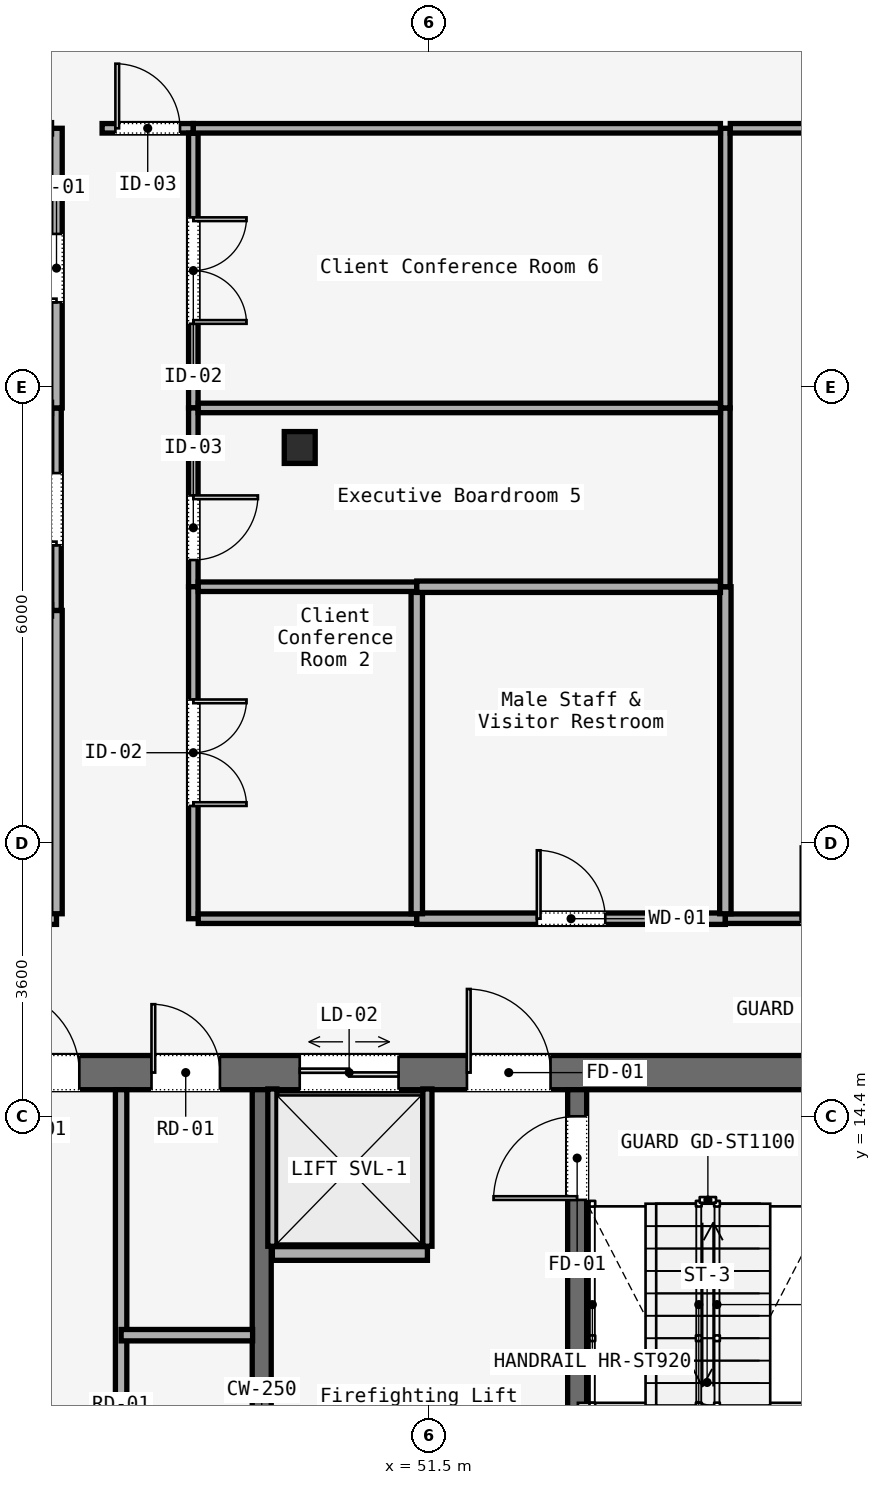
"""IFC4 building model, lengths in metres.
Left out: names, types, materials, properties, quantities, classifications, styles, units other than length and angle.
Written with IfcOpenShell. Run it as: python <this file> out.ifc"""

import sys

from ifc_helpers import new_model, si_unit, direction, frame, frame_2d, origin, origin_2d, place, context, subcontext, project, spatial, rectangle, i_section, extrude, element, fill, save


model = new_model("IFC4")
c1 = context("Model", 3, precision=1e-05, world=origin(), true_north=direction((0.0, 1.0)))
c2 = subcontext(c1, "Body", "Model", "MODEL_VIEW")
j1 = project(units=[si_unit("LENGTHUNIT", "METRE"), si_unit("PLANEANGLEUNIT", "RADIAN")], contexts=[c1])
p1 = place(None, origin())
s1 = spatial("IfcSite", under=j1, at=p1, CompositionType="ELEMENT")
p2 = place(p1, origin())
s2 = spatial("IfcBuilding", under=s1, at=p2, CompositionType="ELEMENT")
p3 = place(p2, frame((0.0, 0.0, 153.6)))
s3 = spatial("IfcBuildingStorey", under=s2, at=p3, CompositionType="ELEMENT", Elevation=153.6)
p4 = place(p3, frame((26.45, 14.975, 0.0), z_axis=(0.0, 0.0, 1.0), x_axis=(1.0, 0.0, 0.0)))
e1 = element("IfcWall", 1, at=p4, inside=s3, PredefinedType="SOLIDWALL", context=c2, shape_type="SweptSolid", body=[
    extrude(rectangle(XDim=31.1, YDim=0.45, at=frame_2d((15.55, 0.0))), origin(), (0.0, 0.0, 1.0), 3.58),
])
p5 = place(p4, frame((1.65, 0.0, 0.0)))
e2 = element("IfcOpeningElement", 2, at=p5, cuts=e1, PredefinedType="OPENING", context=c2, shape_type="SweptSolid", body=[
    extrude(rectangle(XDim=1.1, YDim=2.2, at=frame_2d((0.55, 1.1))), frame((0.0, 0.225, 0.0), z_axis=(0.0, -1.0, 0.0), x_axis=(1.0, 0.0, 0.0)), (0.0, 0.0, 1.0), 0.45),
])
p6 = place(p4, frame((13.65, 0.0, 0.0)))
e3 = element("IfcOpeningElement", 3, at=p6, cuts=e1, PredefinedType="OPENING", context=c2, shape_type="SweptSolid", body=[
    extrude(rectangle(XDim=1.1, YDim=2.2, at=frame_2d((0.55, 1.1))), frame((0.0, 0.225, 0.0), z_axis=(0.0, -1.0, 0.0), x_axis=(1.0, 0.0, 0.0)), (0.0, 0.0, 1.0), 0.45),
])
p7 = place(p4, frame((25.55, 0.0, 0.0)))
e4 = element("IfcOpeningElement", 4, at=p7, cuts=e1, PredefinedType="OPENING", context=c2, shape_type="SweptSolid", body=[
    extrude(rectangle(XDim=1.1, YDim=2.2, at=frame_2d((0.55, 1.1))), frame((0.0, 0.225, 0.0), z_axis=(0.0, -1.0, 0.0), x_axis=(1.0, 0.0, 0.0)), (0.0, 0.0, 1.0), 0.45),
])
p8 = place(p4, frame((10.7, 0.0, 0.0)))
e5 = element("IfcOpeningElement", 5, at=p8, cuts=e1, PredefinedType="OPENING", context=c2, shape_type="SweptSolid", body=[
    extrude(rectangle(XDim=1.4, YDim=2.2, at=frame_2d((0.7, 1.1))), frame((0.0, 0.225, 0.0), z_axis=(0.0, -1.0, 0.0), x_axis=(1.0, 0.0, 0.0)), (0.0, 0.0, 1.0), 0.45),
])
p9 = place(p4, frame((19.35, 0.0, 0.0)))
e6 = element("IfcOpeningElement", 6, at=p9, cuts=e1, PredefinedType="OPENING", context=c2, shape_type="SweptSolid", body=[
    extrude(rectangle(XDim=1.1, YDim=2.2, at=frame_2d((0.55, 1.1))), frame((0.0, 0.225, 0.0), z_axis=(0.0, -1.0, 0.0), x_axis=(1.0, 0.0, 0.0)), (0.0, 0.0, 1.0), 0.45),
])
p10 = place(p4, frame((21.4, 0.0, 0.0)))
e7 = element("IfcOpeningElement", 7, at=p10, cuts=e1, PredefinedType="OPENING", context=c2, shape_type="SweptSolid", body=[
    extrude(rectangle(XDim=0.9, YDim=2.1, at=frame_2d((0.45, 1.05))), frame((0.0, 0.225, 0.0), z_axis=(0.0, -1.0, 0.0), x_axis=(1.0, 0.0, 0.0)), (0.0, 0.0, 1.0), 0.45),
])
p11 = place(p4, frame((23.35, 0.0, 0.0)))
e8 = element("IfcOpeningElement", 8, at=p11, cuts=e1, PredefinedType="OPENING", context=c2, shape_type="SweptSolid", body=[
    extrude(rectangle(XDim=1.3, YDim=2.3, at=frame_2d((0.65, 1.15))), frame((0.0, 0.225, 0.0), z_axis=(0.0, -1.0, 0.0), x_axis=(1.0, 0.0, 0.0)), (0.0, 0.0, 1.0), 0.45),
])
p12 = place(p3, frame((49.3, 5.85, 0.0), z_axis=(0.0, 0.0, 1.0), x_axis=(0.0, 1.0, 0.0)))
e9 = element("IfcWall", 9, at=p12, inside=s3, PredefinedType="SOLIDWALL", context=c2, shape_type="SweptSolid", body=[
    extrude(rectangle(XDim=8.9, YDim=0.25, at=frame_2d((4.45, 0.0))), origin(), (0.0, 0.0, 1.0), 3.58),
])
p13 = place(p3, frame((53.45, 5.85, 0.0), z_axis=(0.0, 0.0, 1.0), x_axis=(0.0, 1.0, 0.0)))
e10 = element("IfcWall", 10, at=p13, inside=s3, PredefinedType="SOLIDWALL", context=c2, shape_type="SweptSolid", body=[
    extrude(rectangle(XDim=8.9, YDim=0.25, at=frame_2d((4.45, 0.0))), origin(), (0.0, 0.0, 1.0), 3.58),
])
p14 = place(p13, frame((7.45, 0.0, 0.0)))
e11 = element("IfcOpeningElement", 11, at=p14, cuts=e10, PredefinedType="OPENING", context=c2, shape_type="SweptSolid", body=[
    extrude(rectangle(XDim=1.1, YDim=2.2, at=frame_2d((0.55, 1.1))), frame((0.0, 0.125, 0.0), z_axis=(0.0, -1.0, 0.0), x_axis=(1.0, 0.0, 0.0)), (0.0, 0.0, 1.0), 0.25),
])
p15 = place(p3, frame((49.8, 23.2, 0.0), z_axis=(0.0, 0.0, 1.0), x_axis=(1.0, 0.0, 0.0)))
e12 = element("IfcColumn", 12, at=p15, inside=s3, PredefinedType="COLUMN", context=c2, shape_type="SweptSolid", body=[
    extrude(i_section(OverallWidth=0.407, OverallDepth=0.419, WebThickness=0.031, FlangeThickness=0.049, FilletRadius=0.015, at=origin_2d()), origin(), (0.0, 0.0, 1.0), 3.58),
])
p16 = place(p3, frame((47.45, 5.9, 0.0), z_axis=(0.0, 0.0, 1.0), x_axis=(0.0, 1.0, 0.0)))
e13 = element("IfcWall", 13, at=p16, inside=s3, PredefinedType="PARTITIONING", context=c2, shape_type="SweptSolid", body=[
    extrude(rectangle(XDim=8.85, YDim=0.15, at=frame_2d((4.425, 0.0))), origin(), (0.0, 0.0, 1.0), 3.01),
])
p17 = place(p16, frame((3.2, 0.0, 0.0)))
e14 = element("IfcOpeningElement", 14, at=p17, cuts=e13, PredefinedType="OPENING", context=c2, shape_type="SweptSolid", body=[
    extrude(rectangle(XDim=0.9, YDim=2.1, at=frame_2d((0.45, 1.05))), frame((0.0, 0.075, 0.0), z_axis=(0.0, -1.0, 0.0), x_axis=(1.0, 0.0, 0.0)), (0.0, 0.0, 1.0), 0.15),
])
p18 = place(p3, frame((47.45, 11.52, 0.0), z_axis=(0.0, 0.0, 1.0), x_axis=(1.0, 0.0, 0.0)))
e15 = element("IfcWall", 15, at=p18, inside=s3, PredefinedType="PARTITIONING", context=c2, shape_type="SweptSolid", body=[
    extrude(rectangle(XDim=1.73, YDim=0.15, at=frame_2d((0.865, 0.0))), origin(), (0.0, 0.0, 1.0), 3.01),
])
p19 = place(p3, frame((49.44, 12.595, 0.0), z_axis=(0.0, 0.0, 1.0), x_axis=(1.0, 0.0, 0.0)))
e16 = element("IfcWall", 16, at=p19, inside=s3, PredefinedType="SOLIDWALL", context=c2, shape_type="SweptSolid", body=[
    extrude(rectangle(XDim=2.04, YDim=0.18, at=frame_2d((1.02, 0.0))), origin(), (0.0, 0.0, 1.0), 3.01),
])
for number, where, z_axis, x_axis in (
    (17, (49.44, 12.69, 0.0), (0.0, 0.0, 1.0), (0.0, 1.0, 0.0)),
    (18, (51.48, 12.69, 0.0), (0.0, 0.0, 1.0), (0.0, 1.0, 0.0)),
):
    element("IfcWall", number, at=place(p3, frame(where, z_axis=z_axis, x_axis=x_axis)), inside=s3, PredefinedType="SOLIDWALL", context=c2, shape_type="SweptSolid", body=[
        extrude(rectangle(XDim=2.07, YDim=0.12, at=frame_2d((1.035, 0.0))), origin(), (0.0, 0.0, 1.0), 3.01),
    ])
p20 = place(p3, frame((41.11, 17.0, 0.0), z_axis=(0.0, 0.0, 1.0), x_axis=(1.0, 0.0, 0.0)))
e19 = element("IfcWall", 19, at=p20, inside=s3, PredefinedType="PARTITIONING", context=c2, shape_type="SweptSolid", body=[
    extrude(rectangle(XDim=5.49, YDim=0.15, at=frame_2d((2.745, 0.0))), origin(), (0.0, 0.0, 1.0), 3.01),
])
p21 = place(p20, frame((2.27, 0.0, 0.0)))
e20 = element("IfcOpeningElement", 20, at=p21, cuts=e19, PredefinedType="OPENING", context=c2, shape_type="SweptSolid", body=[
    extrude(rectangle(XDim=0.95, YDim=2.2, at=frame_2d((0.475, 1.1))), frame((0.0, 0.075, 0.0), z_axis=(0.0, -1.0, 0.0), x_axis=(1.0, 0.0, 0.0)), (0.0, 0.0, 1.0), 0.15),
])
p22 = place(p3, frame((46.6, 17.065, 0.0), z_axis=(0.0, 0.0, 1.0), x_axis=(0.0, 1.0, 0.0)))
e21 = element("IfcWall", 21, at=p22, inside=s3, PredefinedType="PARTITIONING", context=c2, shape_type="SweptSolid", body=[
    extrude(rectangle(XDim=3.991, YDim=0.15, at=frame_2d((1.996, 0.0))), origin(), (0.0, 0.0, 1.0), 3.01),
])
p23 = place(p3, frame((46.6, 21.056, 0.0), z_axis=(0.0, 0.0, 1.0), x_axis=(0.0, 1.0, 0.0)))
e22 = element("IfcWall", 22, at=p23, inside=s3, PredefinedType="PARTITIONING", context=c2, shape_type="SweptSolid", body=[
    extrude(rectangle(XDim=2.665, YDim=0.125, at=frame_2d((1.332, 0.0))), origin(), (0.0, 0.0, 1.0), 3.01),
])
p24 = place(p23, frame((0.857, 0.0, 0.0)))
e23 = element("IfcOpeningElement", 23, at=p24, cuts=e22, PredefinedType="OPENING", context=c2, shape_type="SweptSolid", body=[
    extrude(rectangle(XDim=0.95, YDim=2.2, at=frame_2d((0.475, 1.1))), frame((0.0, 0.062, 0.0), z_axis=(0.0, -1.0, 0.0), x_axis=(1.0, 0.0, 0.0)), (0.0, 0.0, 1.0), 0.125),
])
p25 = place(p3, frame((46.6, 23.72, 0.0), z_axis=(0.0, 0.0, 1.0), x_axis=(0.0, 1.0, 0.0)))
e24 = element("IfcWall", 24, at=p25, inside=s3, PredefinedType="PARTITIONING", context=c2, shape_type="SweptSolid", body=[
    extrude(rectangle(XDim=3.679, YDim=0.15, at=frame_2d((1.84, 0.0))), origin(), (0.0, 0.0, 1.0), 3.01),
])
p26 = place(p25, frame((1.39, 0.0, 0.0)))
e25 = element("IfcOpeningElement", 25, at=p26, cuts=e24, PredefinedType="OPENING", context=c2, shape_type="SweptSolid", body=[
    extrude(rectangle(XDim=0.9, YDim=2.15, at=frame_2d((0.45, 1.075))), frame((0.0, 0.075, 0.0), z_axis=(0.0, -1.0, 0.0), x_axis=(1.0, 0.0, 0.0)), (0.0, 0.0, 1.0), 0.15),
])
p27 = place(p3, frame((47.2, 27.4, 0.0), z_axis=(0.0, 0.0, 1.0), x_axis=(1.0, 0.0, 0.0)))
e26 = element("IfcWall", 26, at=p27, inside=s3, PredefinedType="PARTITIONING", context=c2, shape_type="SweptSolid", body=[
    extrude(rectangle(XDim=1.2, YDim=0.125, at=frame_2d((0.6, 0.0))), origin(), (0.0, 0.0, 1.0), 3.01),
])
p28 = place(p27, frame((0.175, 0.0, 0.0)))
e27 = element("IfcOpeningElement", 27, at=p28, cuts=e26, PredefinedType="OPENING", context=c2, shape_type="SweptSolid", body=[
    extrude(rectangle(XDim=0.85, YDim=2.15, at=frame_2d((0.425, 1.075))), frame((0.0, 0.062, 0.0), z_axis=(0.0, -1.0, 0.0), x_axis=(1.0, 0.0, 0.0)), (0.0, 0.0, 1.0), 0.125),
])
p29 = place(p3, frame((48.4, 27.335, 0.0), z_axis=(0.0, 0.0, 1.0), x_axis=(0.0, -1.0, 0.0)))
e28 = element("IfcWall", 28, at=p29, inside=s3, PredefinedType="PARTITIONING", context=c2, shape_type="SweptSolid", body=[
    extrude(rectangle(XDim=3.615, YDim=0.125, at=frame_2d((1.807, 0.0))), origin(), (0.0, 0.0, 1.0), 3.01),
])
p30 = place(p29, frame((1.107, 0.0, 0.0)))
e29 = element("IfcOpeningElement", 29, at=p30, cuts=e28, PredefinedType="OPENING", context=c2, shape_type="SweptSolid", body=[
    extrude(rectangle(XDim=1.4, YDim=2.2, at=frame_2d((0.7, 1.1))), frame((0.0, 0.062, 0.0), z_axis=(0.0, -1.0, 0.0), x_axis=(1.0, 0.0, 0.0)), (0.0, 0.0, 1.0), 0.125),
])
p31 = place(p3, frame((48.4, 23.72, 0.0), z_axis=(0.0, 0.0, 1.0), x_axis=(0.0, -1.0, 0.0)))
e30 = element("IfcWall", 30, at=p31, inside=s3, PredefinedType="PARTITIONING", context=c2, shape_type="SweptSolid", body=[
    extrude(rectangle(XDim=2.353, YDim=0.125, at=frame_2d((1.176, 0.0))), origin(), (0.0, 0.0, 1.0), 3.01),
])
p32 = place(p31, frame((1.151, 0.0, 0.0)))
e31 = element("IfcOpeningElement", 31, at=p32, cuts=e30, PredefinedType="OPENING", context=c2, shape_type="SweptSolid", body=[
    extrude(rectangle(XDim=0.85, YDim=2.15, at=frame_2d((0.425, 1.075))), frame((0.0, 0.062, 0.0), z_axis=(0.0, -1.0, 0.0), x_axis=(1.0, 0.0, 0.0)), (0.0, 0.0, 1.0), 0.125),
])
p33 = place(p3, frame((48.4, 21.368, 0.0), z_axis=(0.0, 0.0, 1.0), x_axis=(0.0, -1.0, 0.0)))
e32 = element("IfcWall", 32, at=p33, inside=s3, PredefinedType="PARTITIONING", context=c2, shape_type="SweptSolid", body=[
    extrude(rectangle(XDim=4.368, YDim=0.125, at=frame_2d((2.184, 0.0))), origin(), (0.0, 0.0, 1.0), 3.01),
])
p34 = place(p33, frame((1.484, 0.0, 0.0)))
e33 = element("IfcOpeningElement", 33, at=p34, cuts=e32, PredefinedType="OPENING", context=c2, shape_type="SweptSolid", body=[
    extrude(rectangle(XDim=1.4, YDim=2.2, at=frame_2d((0.7, 1.1))), frame((0.0, 0.062, 0.0), z_axis=(0.0, -1.0, 0.0), x_axis=(1.0, 0.0, 0.0)), (0.0, 0.0, 1.0), 0.125),
])
p35 = place(p3, frame((48.465, 17.0, 0.0), z_axis=(0.0, 0.0, 1.0), x_axis=(1.0, 0.0, 0.0)))
e34 = element("IfcWall", 34, at=p35, inside=s3, PredefinedType="PARTITIONING", context=c2, shape_type="SweptSolid", body=[
    extrude(rectangle(XDim=2.875, YDim=0.125, at=frame_2d((1.438, 0.0))), origin(), (0.0, 0.0, 1.0), 3.01),
])
p36 = place(p3, frame((51.34, 17.0, 0.0), z_axis=(0.0, 0.0, 1.0), x_axis=(1.0, 0.0, 0.0)))
e35 = element("IfcWall", 35, at=p36, inside=s3, PredefinedType="PARTITIONING", context=c2, shape_type="SweptSolid", body=[
    extrude(rectangle(XDim=4.06, YDim=0.15, at=frame_2d((2.03, 0.0))), origin(), (0.0, 0.0, 1.0), 3.01),
])
p37 = place(p36, frame((1.58, 0.0, 0.0)))
e36 = element("IfcOpeningElement", 36, at=p37, cuts=e35, PredefinedType="OPENING", context=c2, shape_type="SweptSolid", body=[
    extrude(rectangle(XDim=0.9, YDim=2.15, at=frame_2d((0.45, 1.075))), frame((0.0, 0.075, 0.0), z_axis=(0.0, -1.0, 0.0), x_axis=(1.0, 0.0, 0.0)), (0.0, 0.0, 1.0), 0.15),
])
p38 = place(p3, frame((55.4, 17.0, 0.0), z_axis=(0.0, 0.0, 1.0), x_axis=(1.0, 0.0, 0.0)))
e37 = element("IfcWall", 37, at=p38, inside=s3, PredefinedType="PARTITIONING", context=c2, shape_type="SweptSolid", body=[
    extrude(rectangle(XDim=2.935, YDim=0.125, at=frame_2d((1.468, 0.0))), origin(), (0.0, 0.0, 1.0), 3.01),
])
p39 = place(p38, frame((0.992, 0.0, 0.0)))
e38 = element("IfcOpeningElement", 38, at=p39, cuts=e37, PredefinedType="OPENING", context=c2, shape_type="SweptSolid", body=[
    extrude(rectangle(XDim=0.95, YDim=2.2, at=frame_2d((0.475, 1.1))), frame((0.0, 0.062, 0.0), z_axis=(0.0, -1.0, 0.0), x_axis=(1.0, 0.0, 0.0)), (0.0, 0.0, 1.0), 0.125),
])
p40 = place(p3, frame((48.465, 21.368, 0.0), z_axis=(0.0, 0.0, 1.0), x_axis=(1.0, 0.0, 0.0)))
e39 = element("IfcWall", 39, at=p40, inside=s3, PredefinedType="PARTITIONING", context=c2, shape_type="SweptSolid", body=[
    extrude(rectangle(XDim=2.875, YDim=0.125, at=frame_2d((1.438, 0.0))), origin(), (0.0, 0.0, 1.0), 3.01),
])
p41 = place(p3, frame((51.34, 21.303, 0.0), z_axis=(0.0, 0.0, 1.0), x_axis=(0.0, -1.0, 0.0)))
e40 = element("IfcWall", 40, at=p41, inside=s3, PredefinedType="PARTITIONING", context=c2, shape_type="SweptSolid", body=[
    extrude(rectangle(XDim=4.238, YDim=0.15, at=frame_2d((2.119, 0.0))), origin(), (0.0, 0.0, 1.0), 3.01),
])
p42 = place(p3, frame((55.4, 21.368, 0.0), z_axis=(0.0, 0.0, 1.0), x_axis=(0.0, -1.0, 0.0)))
e41 = element("IfcWall", 41, at=p42, inside=s3, PredefinedType="PARTITIONING", context=c2, shape_type="SweptSolid", body=[
    extrude(rectangle(XDim=4.303, YDim=0.15, at=frame_2d((2.151, 0.0))), origin(), (0.0, 0.0, 1.0), 3.01),
])
p43 = place(p3, frame((51.34, 21.368, 0.0), z_axis=(0.0, 0.0, 1.0), x_axis=(1.0, 0.0, 0.0)))
e42 = element("IfcWall", 42, at=p43, inside=s3, PredefinedType="PARTITIONING", context=c2, shape_type="SweptSolid", body=[
    extrude(rectangle(XDim=3.995, YDim=0.15, at=frame_2d((1.998, 0.0))), origin(), (0.0, 0.0, 1.0), 3.01),
])
p44 = place(p3, frame((55.4, 21.368, 0.0), z_axis=(0.0, 0.0, 1.0), x_axis=(0.0, 1.0, 0.0)))
e43 = element("IfcWall", 43, at=p44, inside=s3, PredefinedType="PARTITIONING", context=c2, shape_type="SweptSolid", body=[
    extrude(rectangle(XDim=2.353, YDim=0.125, at=frame_2d((1.176, 0.0))), origin(), (0.0, 0.0, 1.0), 3.01),
])
p45 = place(p3, frame((55.4, 23.72, 0.0), z_axis=(0.0, 0.0, 1.0), x_axis=(0.0, 1.0, 0.0)))
e44 = element("IfcWall", 44, at=p45, inside=s3, PredefinedType="PARTITIONING", context=c2, shape_type="SweptSolid", body=[
    extrude(rectangle(XDim=3.679, YDim=0.125, at=frame_2d((1.84, 0.0))), origin(), (0.0, 0.0, 1.0), 3.01),
])
p46 = place(p3, frame((55.465, 27.4, 0.0), z_axis=(0.0, 0.0, 1.0), x_axis=(1.0, 0.0, 0.0)))
e45 = element("IfcWall", 45, at=p46, inside=s3, PredefinedType="PARTITIONING", context=c2, shape_type="SweptSolid", body=[
    extrude(rectangle(XDim=2.954, YDim=0.125, at=frame_2d((1.477, 0.0))), origin(), (0.0, 0.0, 1.0), 3.01),
])
p47 = place(p3, frame((48.465, 23.72, 0.0), z_axis=(0.0, 0.0, 1.0), x_axis=(1.0, 0.0, 0.0)))
e46 = element("IfcWall", 46, at=p47, inside=s3, PredefinedType="PARTITIONING", context=c2, shape_type="SweptSolid", body=[
    extrude(rectangle(XDim=6.87, YDim=0.125, at=frame_2d((3.435, 0.0))), origin(), (0.0, 0.0, 1.0), 3.01),
])
p48 = place(p3, frame((48.4, 27.4, 0.0), z_axis=(0.0, 0.0, 1.0), x_axis=(1.0, 0.0, 0.0)))
e47 = element("IfcWall", 47, at=p48, inside=s3, PredefinedType="PARTITIONING", context=c2, shape_type="SweptSolid", body=[
    extrude(rectangle(XDim=6.935, YDim=0.125, at=frame_2d((3.468, 0.0))), origin(), (0.0, 0.0, 1.0), 3.01),
])
p49 = place(p7, origin())
e48 = element("IfcDoor", 48, at=p49, inside=s3, OperationType="SINGLE_SWING_RIGHT", PredefinedType="DOOR", context=c2, shape_type="SweptSolid", body=[
    extrude(rectangle(XDim=1.1, YDim=2.2, at=frame_2d((0.55, 1.1))), frame((0.0, 0.025, 0.0), z_axis=(0.0, -1.0, 0.0), x_axis=(1.0, 0.0, 0.0)), (0.0, 0.0, 1.0), 0.05),
])
fill(e4, e48)
p50 = place(p9, origin())
e49 = element("IfcDoor", 49, at=p50, inside=s3, OperationType="SINGLE_SWING_LEFT", PredefinedType="DOOR", context=c2, shape_type="SweptSolid", body=[
    extrude(rectangle(XDim=1.1, YDim=2.2, at=frame_2d((0.55, 1.1))), frame((0.0, 0.025, 0.0), z_axis=(0.0, -1.0, 0.0), x_axis=(1.0, 0.0, 0.0)), (0.0, 0.0, 1.0), 0.05),
])
fill(e6, e49)
p51 = place(p10, origin())
e50 = element("IfcDoor", 50, at=p51, inside=s3, OperationType="SINGLE_SWING_LEFT", PredefinedType="DOOR", context=c2, shape_type="SweptSolid", body=[
    extrude(rectangle(XDim=0.9, YDim=2.1, at=frame_2d((0.45, 1.05))), frame((0.0, 0.025, 0.0), z_axis=(0.0, -1.0, 0.0), x_axis=(1.0, 0.0, 0.0)), (0.0, 0.0, 1.0), 0.05),
])
fill(e7, e50)
p52 = place(p14, origin())
e51 = element("IfcDoor", 51, at=p52, inside=s3, OperationType="SINGLE_SWING_LEFT", PredefinedType="DOOR", context=c2, shape_type="SweptSolid", body=[
    extrude(rectangle(XDim=1.1, YDim=2.2, at=frame_2d((0.55, 1.1))), frame((0.0, 0.025, 0.0), z_axis=(0.0, -1.0, 0.0), x_axis=(1.0, 0.0, 0.0)), (0.0, 0.0, 1.0), 0.05),
])
fill(e11, e51)
p53 = place(p11, origin())
e52 = element("IfcDoor", 52, at=p53, inside=s3, OperationType="DOUBLE_DOOR_SLIDING", PredefinedType="DOOR", context=c2, shape_type="SweptSolid", body=[
    extrude(rectangle(XDim=1.3, YDim=2.3, at=frame_2d((0.65, 1.15))), frame((0.0, 0.025, 0.0), z_axis=(0.0, -1.0, 0.0), x_axis=(1.0, 0.0, 0.0)), (0.0, 0.0, 1.0), 0.05),
])
fill(e8, e52)
p54 = place(p34, origin())
e53 = element("IfcDoor", 53, at=p54, inside=s3, OperationType="SINGLE_SWING_LEFT", PredefinedType="DOOR", context=c2, shape_type="SweptSolid", body=[
    extrude(rectangle(XDim=1.4, YDim=2.2, at=frame_2d((0.7, 1.1))), frame((0.0, 0.025, 0.0), z_axis=(0.0, -1.0, 0.0), x_axis=(1.0, 0.0, 0.0)), (0.0, 0.0, 1.0), 0.05),
])
fill(e33, e53)
p55 = place(p37, origin())
e54 = element("IfcDoor", 54, at=p55, inside=s3, OperationType="SINGLE_SWING_RIGHT", PredefinedType="DOOR", context=c2, shape_type="SweptSolid", body=[
    extrude(rectangle(XDim=0.9, YDim=2.15, at=frame_2d((0.45, 1.075))), frame((0.0, 0.025, 0.0), z_axis=(0.0, -1.0, 0.0), x_axis=(1.0, 0.0, 0.0)), (0.0, 0.0, 1.0), 0.05),
])
fill(e36, e54)
p56 = place(p39, origin())
e55 = element("IfcDoor", 55, at=p56, inside=s3, OperationType="SINGLE_SWING_RIGHT", PredefinedType="DOOR", context=c2, shape_type="SweptSolid", body=[
    extrude(rectangle(XDim=0.95, YDim=2.2, at=frame_2d((0.475, 1.1))), frame((0.0, 0.025, 0.0), z_axis=(0.0, -1.0, 0.0), x_axis=(1.0, 0.0, 0.0)), (0.0, 0.0, 1.0), 0.05),
])
fill(e38, e55)
p57 = place(p24, origin())
e56 = element("IfcDoor", 56, at=p57, inside=s3, OperationType="SINGLE_SWING_RIGHT", PredefinedType="DOOR", context=c2, shape_type="SweptSolid", body=[
    extrude(rectangle(XDim=0.95, YDim=2.2, at=frame_2d((0.475, 1.1))), frame((0.0, 0.025, 0.0), z_axis=(0.0, -1.0, 0.0), x_axis=(1.0, 0.0, 0.0)), (0.0, 0.0, 1.0), 0.05),
])
fill(e23, e56)
p58 = place(p32, origin())
e57 = element("IfcDoor", 57, at=p58, inside=s3, OperationType="SINGLE_SWING_LEFT", PredefinedType="DOOR", context=c2, shape_type="SweptSolid", body=[
    extrude(rectangle(XDim=0.85, YDim=2.15, at=frame_2d((0.425, 1.075))), frame((0.0, 0.025, 0.0), z_axis=(0.0, -1.0, 0.0), x_axis=(1.0, 0.0, 0.0)), (0.0, 0.0, 1.0), 0.05),
])
fill(e31, e57)
p59 = place(p26, origin())
e58 = element("IfcDoor", 58, at=p59, inside=s3, OperationType="SINGLE_SWING_RIGHT", PredefinedType="DOOR", context=c2, shape_type="SweptSolid", body=[
    extrude(rectangle(XDim=0.9, YDim=2.15, at=frame_2d((0.45, 1.075))), frame((0.0, 0.025, 0.0), z_axis=(0.0, -1.0, 0.0), x_axis=(1.0, 0.0, 0.0)), (0.0, 0.0, 1.0), 0.05),
])
fill(e25, e58)
p60 = place(p30, origin())
e59 = element("IfcDoor", 59, at=p60, inside=s3, OperationType="SINGLE_SWING_LEFT", PredefinedType="DOOR", context=c2, shape_type="SweptSolid", body=[
    extrude(rectangle(XDim=1.4, YDim=2.2, at=frame_2d((0.7, 1.1))), frame((0.0, 0.025, 0.0), z_axis=(0.0, -1.0, 0.0), x_axis=(1.0, 0.0, 0.0)), (0.0, 0.0, 1.0), 0.05),
])
fill(e29, e59)
p61 = place(p28, origin())
e60 = element("IfcDoor", 60, at=p61, inside=s3, OperationType="SINGLE_SWING_LEFT", PredefinedType="DOOR", context=c2, shape_type="SweptSolid", body=[
    extrude(rectangle(XDim=0.85, YDim=2.15, at=frame_2d((0.425, 1.075))), frame((0.0, 0.025, 0.0), z_axis=(0.0, -1.0, 0.0), x_axis=(1.0, 0.0, 0.0)), (0.0, 0.0, 1.0), 0.05),
])
fill(e27, e60)
save(model, sys.argv[1])
